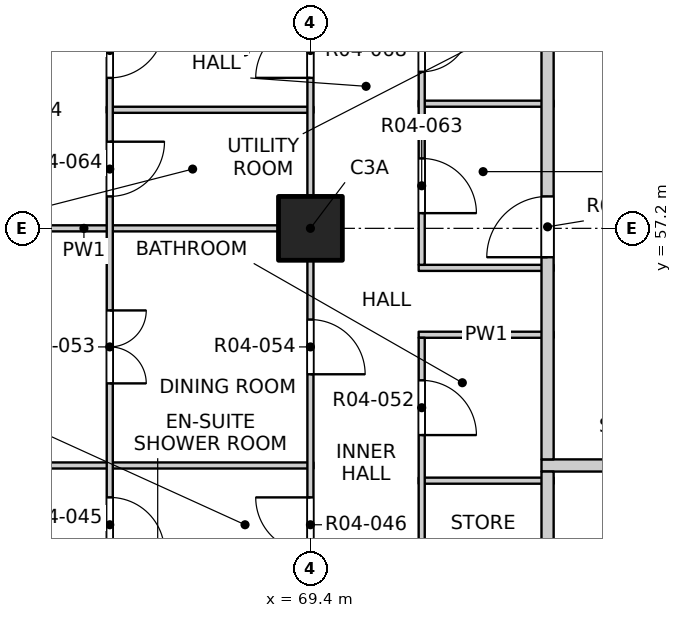
"""IFC4 building model, lengths in metres.
Left out: names, types, materials, properties, quantities, classifications, styles, units other than length and angle.
Written with IfcOpenShell. Run it as: python <this file> out.ifc"""

import sys

from ifc_helpers import new_model, si_unit, direction, frame, frame_2d, origin, origin_2d, place, context, subcontext, project, spatial, rectangle, extrude, element, fill, save


model = new_model("IFC4")
c1 = context("Model", 3, precision=1e-05, world=origin(), true_north=direction((0.0, 1.0)))
c2 = subcontext(c1, "Body", "Model", "MODEL_VIEW")
j1 = project(units=[si_unit("LENGTHUNIT", "METRE"), si_unit("PLANEANGLEUNIT", "RADIAN")], contexts=[c1])
p1 = place(None, origin())
s1 = spatial("IfcSite", under=j1, at=p1, CompositionType="ELEMENT")
p2 = place(p1, origin())
s2 = spatial("IfcBuilding", under=s1, at=p2, CompositionType="ELEMENT")
p3 = place(p2, frame((0.0, 0.0, 58.0)))
s3 = spatial("IfcBuildingStorey", under=s2, at=p3, CompositionType="ELEMENT", Elevation=58.0)
p4 = place(p3, frame((69.4, 57.2, -0.25), z_axis=(0.0, 0.0, 1.0), x_axis=(1.0, 0.0, 0.0)))
e1 = element("IfcColumn", 1, at=p4, inside=s3, PredefinedType="COLUMN", context=c2, shape_type="SweptSolid", body=[
    extrude(rectangle(XDim=1.05, YDim=1.05, at=origin_2d()), origin(), (0.0, 0.0, 1.0), 3.4),
])
p5 = place(p3, frame((71.18, 53.05, 0.0), z_axis=(0.0, 0.0, 1.0), x_axis=(1.0, 0.0, 0.0)))
e2 = element("IfcWall", 2, at=p5, inside=s3, PredefinedType="PARTITIONING", context=c2, shape_type="SweptSolid", body=[
    extrude(rectangle(XDim=2.22, YDim=0.1, at=frame_2d((1.11, 0.0))), origin(), (0.0, 0.0, 1.0), 3.15),
])
p6 = place(p3, frame((61.9, 53.3, 0.0), z_axis=(0.0, 0.0, 1.0), x_axis=(1.0, 0.0, 0.0)))
e3 = element("IfcWall", 3, at=p6, inside=s3, PredefinedType="PARTITIONING", context=c2, shape_type="SweptSolid", body=[
    extrude(rectangle(XDim=7.55, YDim=0.1, at=frame_2d((3.775, 0.0))), origin(), (0.0, 0.0, 1.0), 3.15),
])
p7 = place(p3, frame((73.2, 53.3, 0.0), z_axis=(0.0, 0.0, 1.0), x_axis=(1.0, 0.0, 0.0)))
e4 = element("IfcWall", 4, at=p7, inside=s3, PredefinedType="PARTITIONING", context=c2, shape_type="SweptSolid", body=[
    extrude(rectangle(XDim=23.6, YDim=0.2, at=frame_2d((11.8, 0.0))), origin(), (0.0, 0.0, 1.0), 3.15),
])
p8 = place(p7, frame((2.975, 0.0, 0.0)))
e5 = element("IfcOpeningElement", 5, at=p8, cuts=e4, PredefinedType="OPENING", context=c2, shape_type="SweptSolid", body=[
    extrude(rectangle(XDim=1.0, YDim=2.1, at=frame_2d((0.5, 1.05))), frame((0.0, 0.11, 0.0), z_axis=(0.0, -1.0, 0.0), x_axis=(1.0, 0.0, 0.0)), (0.0, 0.0, 1.0), 0.22),
])
p9 = place(p7, frame((17.875, 0.0, 0.0)))
e6 = element("IfcOpeningElement", 6, at=p9, cuts=e4, PredefinedType="OPENING", context=c2, shape_type="SweptSolid", body=[
    extrude(rectangle(XDim=1.0, YDim=2.1, at=frame_2d((0.5, 1.05))), frame((0.0, 0.11, 0.0), z_axis=(0.0, -1.0, 0.0), x_axis=(1.0, 0.0, 0.0)), (0.0, 0.0, 1.0), 0.22),
])
for number, where, z_axis, x_axis in (
    (7, (71.18, 55.45, 0.0), (0.0, 0.0, 1.0), (1.0, 0.0, 0.0)),
    (8, (71.18, 56.55, 0.0), (0.0, 0.0, 1.0), (1.0, 0.0, 0.0)),
):
    element("IfcWall", number, at=place(p3, frame(where, z_axis=z_axis, x_axis=x_axis)), inside=s3, PredefinedType="PARTITIONING", context=c2, shape_type="SweptSolid", body=[
        extrude(rectangle(XDim=2.22, YDim=0.1, at=frame_2d((1.11, 0.0))), origin(), (0.0, 0.0, 1.0), 3.15),
    ])
p10 = place(p3, frame((61.9, 57.2, 0.0), z_axis=(0.0, 0.0, 1.0), x_axis=(1.0, 0.0, 0.0)))
e9 = element("IfcWall", 9, at=p10, inside=s3, PredefinedType="PARTITIONING", context=c2, shape_type="SweptSolid", body=[
    extrude(rectangle(XDim=7.55, YDim=0.1, at=frame_2d((3.775, 0.0))), origin(), (0.0, 0.0, 1.0), 2.55),
])
p11 = place(p3, frame((66.05, 59.15, 0.0), z_axis=(0.0, 0.0, 1.0), x_axis=(1.0, 0.0, 0.0)))
e10 = element("IfcWall", 10, at=p11, inside=s3, PredefinedType="PARTITIONING", context=c2, shape_type="SweptSolid", body=[
    extrude(rectangle(XDim=3.4, YDim=0.1, at=frame_2d((1.7, 0.0))), origin(), (0.0, 0.0, 1.0), 3.15),
])
p12 = place(p3, frame((71.18, 59.25, 0.0), z_axis=(0.0, 0.0, 1.0), x_axis=(1.0, 0.0, 0.0)))
e11 = element("IfcWall", 11, at=p12, inside=s3, PredefinedType="PARTITIONING", context=c2, shape_type="SweptSolid", body=[
    extrude(rectangle(XDim=2.22, YDim=0.1, at=frame_2d((1.11, 0.0))), origin(), (0.0, 0.0, 1.0), 3.15),
])
p13 = place(p3, frame((66.1, 41.9, 0.0), z_axis=(0.0, 0.0, 1.0), x_axis=(0.0, 1.0, 0.0)))
e12 = element("IfcWall", 12, at=p13, inside=s3, PredefinedType="PARTITIONING", context=c2, shape_type="SweptSolid", body=[
    extrude(rectangle(XDim=19.1, YDim=0.1, at=frame_2d((9.55, 0.0))), origin(), (0.0, 0.0, 1.0), 3.15),
])
p14 = place(p13, frame((1.05, 0.0, 0.0)))
e13 = element("IfcOpeningElement", 13, at=p14, cuts=e12, PredefinedType="OPENING", context=c2, shape_type="SweptSolid", body=[
    extrude(rectangle(XDim=1.2, YDim=2.1, at=frame_2d((0.6, 1.05))), frame((0.0, 0.06, 0.0), z_axis=(0.0, -1.0, 0.0), x_axis=(1.0, 0.0, 0.0)), (0.0, 0.0, 1.0), 0.12),
])
p15 = place(p13, frame((4.125, 0.0, 0.0)))
e14 = element("IfcOpeningElement", 14, at=p15, cuts=e12, PredefinedType="OPENING", context=c2, shape_type="SweptSolid", body=[
    extrude(rectangle(XDim=0.9, YDim=2.1, at=frame_2d((0.45, 1.05))), frame((0.0, 0.06, 0.0), z_axis=(0.0, -1.0, 0.0), x_axis=(1.0, 0.0, 0.0)), (0.0, 0.0, 1.0), 0.12),
])
p16 = place(p13, frame((6.075, 0.0, 0.0)))
e15 = element("IfcOpeningElement", 15, at=p16, cuts=e12, PredefinedType="OPENING", context=c2, shape_type="SweptSolid", body=[
    extrude(rectangle(XDim=0.9, YDim=2.1, at=frame_2d((0.45, 1.05))), frame((0.0, 0.06, 0.0), z_axis=(0.0, -1.0, 0.0), x_axis=(1.0, 0.0, 0.0)), (0.0, 0.0, 1.0), 0.12),
])
p17 = place(p13, frame((8.025, 0.0, 0.0)))
e16 = element("IfcOpeningElement", 16, at=p17, cuts=e12, PredefinedType="OPENING", context=c2, shape_type="SweptSolid", body=[
    extrude(rectangle(XDim=0.9, YDim=2.1, at=frame_2d((0.45, 1.05))), frame((0.0, 0.06, 0.0), z_axis=(0.0, -1.0, 0.0), x_axis=(1.0, 0.0, 0.0)), (0.0, 0.0, 1.0), 0.12),
])
p18 = place(p13, frame((9.975, 0.0, 0.0)))
e17 = element("IfcOpeningElement", 17, at=p18, cuts=e12, PredefinedType="OPENING", context=c2, shape_type="SweptSolid", body=[
    extrude(rectangle(XDim=0.9, YDim=2.1, at=frame_2d((0.45, 1.05))), frame((0.0, 0.06, 0.0), z_axis=(0.0, -1.0, 0.0), x_axis=(1.0, 0.0, 0.0)), (0.0, 0.0, 1.0), 0.12),
])
p19 = place(p13, frame((12.75, 0.0, 0.0)))
e18 = element("IfcOpeningElement", 18, at=p19, cuts=e12, PredefinedType="OPENING", context=c2, shape_type="SweptSolid", body=[
    extrude(rectangle(XDim=1.2, YDim=2.1, at=frame_2d((0.6, 1.05))), frame((0.0, 0.06, 0.0), z_axis=(0.0, -1.0, 0.0), x_axis=(1.0, 0.0, 0.0)), (0.0, 0.0, 1.0), 0.12),
])
p20 = place(p13, frame((15.825, 0.0, 0.0)))
e19 = element("IfcOpeningElement", 19, at=p20, cuts=e12, PredefinedType="OPENING", context=c2, shape_type="SweptSolid", body=[
    extrude(rectangle(XDim=0.9, YDim=2.1, at=frame_2d((0.45, 1.05))), frame((0.0, 0.06, 0.0), z_axis=(0.0, -1.0, 0.0), x_axis=(1.0, 0.0, 0.0)), (0.0, 0.0, 1.0), 0.12),
])
p21 = place(p13, frame((17.775, 0.0, 0.0)))
e20 = element("IfcOpeningElement", 20, at=p21, cuts=e12, PredefinedType="OPENING", context=c2, shape_type="SweptSolid", body=[
    extrude(rectangle(XDim=0.9, YDim=2.1, at=frame_2d((0.45, 1.05))), frame((0.0, 0.06, 0.0), z_axis=(0.0, -1.0, 0.0), x_axis=(1.0, 0.0, 0.0)), (0.0, 0.0, 1.0), 0.12),
])
p22 = place(p3, frame((69.4, 49.4, 0.0), z_axis=(0.0, 0.0, 1.0), x_axis=(0.0, 1.0, 0.0)))
e21 = element("IfcWall", 21, at=p22, inside=s3, PredefinedType="PARTITIONING", context=c2, shape_type="SweptSolid", body=[
    extrude(rectangle(XDim=31.2, YDim=0.1, at=frame_2d((15.6, 0.0))), origin(), (0.0, 0.0, 1.0), 3.15),
])
p23 = place(p22, frame((2.475, 0.0, 0.0)))
e22 = element("IfcOpeningElement", 22, at=p23, cuts=e21, PredefinedType="OPENING", context=c2, shape_type="SweptSolid", body=[
    extrude(rectangle(XDim=0.9, YDim=2.1, at=frame_2d((0.45, 1.05))), frame((0.0, 0.06, 0.0), z_axis=(0.0, -1.0, 0.0), x_axis=(1.0, 0.0, 0.0)), (0.0, 0.0, 1.0), 0.12),
])
p24 = place(p22, frame((5.4, 0.0, 0.0)))
e23 = element("IfcOpeningElement", 23, at=p24, cuts=e21, PredefinedType="OPENING", context=c2, shape_type="SweptSolid", body=[
    extrude(rectangle(XDim=0.9, YDim=2.1, at=frame_2d((0.45, 1.05))), frame((0.0, 0.06, 0.0), z_axis=(0.0, -1.0, 0.0), x_axis=(1.0, 0.0, 0.0)), (0.0, 0.0, 1.0), 0.12),
])
p25 = place(p22, frame((10.275, 0.0, 0.0)))
e24 = element("IfcOpeningElement", 24, at=p25, cuts=e21, PredefinedType="OPENING", context=c2, shape_type="SweptSolid", body=[
    extrude(rectangle(XDim=0.9, YDim=2.1, at=frame_2d((0.45, 1.05))), frame((0.0, 0.06, 0.0), z_axis=(0.0, -1.0, 0.0), x_axis=(1.0, 0.0, 0.0)), (0.0, 0.0, 1.0), 0.12),
])
p26 = place(p22, frame((13.2, 0.0, 0.0)))
e25 = element("IfcOpeningElement", 25, at=p26, cuts=e21, PredefinedType="OPENING", context=c2, shape_type="SweptSolid", body=[
    extrude(rectangle(XDim=0.9, YDim=2.1, at=frame_2d((0.45, 1.05))), frame((0.0, 0.06, 0.0), z_axis=(0.0, -1.0, 0.0), x_axis=(1.0, 0.0, 0.0)), (0.0, 0.0, 1.0), 0.12),
])
p27 = place(p22, frame((18.075, 0.0, 0.0)))
e26 = element("IfcOpeningElement", 26, at=p27, cuts=e21, PredefinedType="OPENING", context=c2, shape_type="SweptSolid", body=[
    extrude(rectangle(XDim=0.9, YDim=2.1, at=frame_2d((0.45, 1.05))), frame((0.0, 0.06, 0.0), z_axis=(0.0, -1.0, 0.0), x_axis=(1.0, 0.0, 0.0)), (0.0, 0.0, 1.0), 0.12),
])
p28 = place(p22, frame((21.8, 0.0, 0.0)))
e27 = element("IfcOpeningElement", 27, at=p28, cuts=e21, PredefinedType="OPENING", context=c2, shape_type="SweptSolid", body=[
    extrude(rectangle(XDim=0.9, YDim=2.1, at=frame_2d((0.45, 1.05))), frame((0.0, 0.06, 0.0), z_axis=(0.0, -1.0, 0.0), x_axis=(1.0, 0.0, 0.0)), (0.0, 0.0, 1.0), 0.12),
])
p29 = place(p22, frame((25.875, 0.0, 0.0)))
e28 = element("IfcOpeningElement", 28, at=p29, cuts=e21, PredefinedType="OPENING", context=c2, shape_type="SweptSolid", body=[
    extrude(rectangle(XDim=0.9, YDim=2.1, at=frame_2d((0.45, 1.05))), frame((0.0, 0.06, 0.0), z_axis=(0.0, -1.0, 0.0), x_axis=(1.0, 0.0, 0.0)), (0.0, 0.0, 1.0), 0.12),
])
p30 = place(p22, frame((29.6, 0.0, 0.0)))
e29 = element("IfcOpeningElement", 29, at=p30, cuts=e21, PredefinedType="OPENING", context=c2, shape_type="SweptSolid", body=[
    extrude(rectangle(XDim=0.9, YDim=2.1, at=frame_2d((0.45, 1.05))), frame((0.0, 0.06, 0.0), z_axis=(0.0, -1.0, 0.0), x_axis=(1.0, 0.0, 0.0)), (0.0, 0.0, 1.0), 0.12),
])
p31 = place(p3, frame((71.23, 45.55, 0.0), z_axis=(0.0, 0.0, 1.0), x_axis=(0.0, 1.0, 0.0)))
e30 = element("IfcWall", 30, at=p31, inside=s3, PredefinedType="PARTITIONING", context=c2, shape_type="SweptSolid", body=[
    extrude(rectangle(XDim=9.85, YDim=0.1, at=frame_2d((4.925, 0.0))), origin(), (0.0, 0.0, 1.0), 3.15),
])
p32 = place(p31, frame((0.4, 0.0, 0.0)))
e31 = element("IfcOpeningElement", 31, at=p32, cuts=e30, PredefinedType="OPENING", context=c2, shape_type="SweptSolid", body=[
    extrude(rectangle(XDim=0.9, YDim=2.1, at=frame_2d((0.45, 1.05))), frame((0.0, 0.06, 0.0), z_axis=(0.0, -1.0, 0.0), x_axis=(1.0, 0.0, 0.0)), (0.0, 0.0, 1.0), 0.12),
])
p33 = place(p31, frame((2.725, 0.0, 0.0)))
e32 = element("IfcOpeningElement", 32, at=p33, cuts=e30, PredefinedType="OPENING", context=c2, shape_type="SweptSolid", body=[
    extrude(rectangle(XDim=0.8, YDim=2.1, at=frame_2d((0.4, 1.05))), frame((0.0, 0.06, 0.0), z_axis=(0.0, -1.0, 0.0), x_axis=(1.0, 0.0, 0.0)), (0.0, 0.0, 1.0), 0.12),
])
p34 = place(p31, frame((5.6, 0.0, 0.0)))
e33 = element("IfcOpeningElement", 33, at=p34, cuts=e30, PredefinedType="OPENING", context=c2, shape_type="SweptSolid", body=[
    extrude(rectangle(XDim=0.8, YDim=2.1, at=frame_2d((0.4, 1.05))), frame((0.0, 0.06, 0.0), z_axis=(0.0, -1.0, 0.0), x_axis=(1.0, 0.0, 0.0)), (0.0, 0.0, 1.0), 0.12),
])
p35 = place(p31, frame((8.25, 0.0, 0.0)))
e34 = element("IfcOpeningElement", 34, at=p35, cuts=e30, PredefinedType="OPENING", context=c2, shape_type="SweptSolid", body=[
    extrude(rectangle(XDim=0.9, YDim=2.1, at=frame_2d((0.45, 1.05))), frame((0.0, 0.06, 0.0), z_axis=(0.0, -1.0, 0.0), x_axis=(1.0, 0.0, 0.0)), (0.0, 0.0, 1.0), 0.12),
])
p36 = place(p3, frame((71.23, 56.6, 0.0), z_axis=(0.0, 0.0, 1.0), x_axis=(0.0, 1.0, 0.0)))
e35 = element("IfcWall", 35, at=p36, inside=s3, PredefinedType="PARTITIONING", context=c2, shape_type="SweptSolid", body=[
    extrude(rectangle(XDim=17.15, YDim=0.1, at=frame_2d((8.575, 0.0))), origin(), (0.0, 0.0, 1.0), 3.15),
])
p37 = place(p36, frame((0.85, 0.0, 0.0)))
e36 = element("IfcOpeningElement", 36, at=p37, cuts=e35, PredefinedType="OPENING", context=c2, shape_type="SweptSolid", body=[
    extrude(rectangle(XDim=0.9, YDim=2.1, at=frame_2d((0.45, 1.05))), frame((0.0, 0.06, 0.0), z_axis=(0.0, -1.0, 0.0), x_axis=(1.0, 0.0, 0.0)), (0.0, 0.0, 1.0), 0.12),
])
p38 = place(p36, frame((3.175, 0.0, 0.0)))
e37 = element("IfcOpeningElement", 37, at=p38, cuts=e35, PredefinedType="OPENING", context=c2, shape_type="SweptSolid", body=[
    extrude(rectangle(XDim=0.8, YDim=2.1, at=frame_2d((0.4, 1.05))), frame((0.0, 0.06, 0.0), z_axis=(0.0, -1.0, 0.0), x_axis=(1.0, 0.0, 0.0)), (0.0, 0.0, 1.0), 0.12),
])
p39 = place(p36, frame((5.66, 0.0, 0.0)))
e38 = element("IfcOpeningElement", 38, at=p39, cuts=e35, PredefinedType="OPENING", context=c2, shape_type="SweptSolid", body=[
    extrude(rectangle(XDim=0.9, YDim=2.1, at=frame_2d((0.45, 1.05))), frame((0.0, 0.06, 0.0), z_axis=(0.0, -1.0, 0.0), x_axis=(1.0, 0.0, 0.0)), (0.0, 0.0, 1.0), 0.12),
])
p40 = place(p36, frame((8.62, 0.0, 0.0)))
e39 = element("IfcOpeningElement", 39, at=p40, cuts=e35, PredefinedType="OPENING", context=c2, shape_type="SweptSolid", body=[
    extrude(rectangle(XDim=0.8, YDim=2.1, at=frame_2d((0.4, 1.05))), frame((0.0, 0.06, 0.0), z_axis=(0.0, -1.0, 0.0), x_axis=(1.0, 0.0, 0.0)), (0.0, 0.0, 1.0), 0.12),
])
p41 = place(p36, frame((11.22, 0.0, 0.0)))
e40 = element("IfcOpeningElement", 40, at=p41, cuts=e35, PredefinedType="OPENING", context=c2, shape_type="SweptSolid", body=[
    extrude(rectangle(XDim=0.8, YDim=2.1, at=frame_2d((0.4, 1.05))), frame((0.0, 0.06, 0.0), z_axis=(0.0, -1.0, 0.0), x_axis=(1.0, 0.0, 0.0)), (0.0, 0.0, 1.0), 0.12),
])
p42 = place(p36, frame((13.67, 0.0, 0.0)))
e41 = element("IfcOpeningElement", 41, at=p42, cuts=e35, PredefinedType="OPENING", context=c2, shape_type="SweptSolid", body=[
    extrude(rectangle(XDim=0.9, YDim=2.1, at=frame_2d((0.45, 1.05))), frame((0.0, 0.06, 0.0), z_axis=(0.0, -1.0, 0.0), x_axis=(1.0, 0.0, 0.0)), (0.0, 0.0, 1.0), 0.12),
])
p43 = place(p36, frame((15.81, 0.0, 0.0)))
e42 = element("IfcOpeningElement", 42, at=p43, cuts=e35, PredefinedType="OPENING", context=c2, shape_type="SweptSolid", body=[
    extrude(rectangle(XDim=0.9, YDim=2.1, at=frame_2d((0.45, 1.05))), frame((0.0, 0.06, 0.0), z_axis=(0.0, -1.0, 0.0), x_axis=(1.0, 0.0, 0.0)), (0.0, 0.0, 1.0), 0.12),
])
p44 = place(p3, frame((73.3, 41.9, 0.0), z_axis=(0.0, 0.0, 1.0), x_axis=(0.0, 1.0, 0.0)))
e43 = element("IfcWall", 43, at=p44, inside=s3, PredefinedType="PARTITIONING", context=c2, shape_type="SweptSolid", body=[
    extrude(rectangle(XDim=11.3, YDim=0.2, at=frame_2d((5.65, 0.0))), origin(), (0.0, 0.0, 1.0), 3.15),
])
p45 = place(p3, frame((73.3, 53.4, 0.0), z_axis=(0.0, 0.0, 1.0), x_axis=(0.0, 1.0, 0.0)))
e44 = element("IfcWall", 44, at=p45, inside=s3, PredefinedType="PARTITIONING", context=c2, shape_type="SweptSolid", body=[
    extrude(rectangle(XDim=31.0, YDim=0.2, at=frame_2d((15.5, 0.0))), origin(), (0.0, 0.0, 1.0), 3.15),
])
p46 = place(p45, frame((3.325, 0.0, 0.0)))
e45 = element("IfcOpeningElement", 45, at=p46, cuts=e44, PredefinedType="OPENING", context=c2, shape_type="SweptSolid", body=[
    extrude(rectangle(XDim=1.0, YDim=2.1, at=frame_2d((0.5, 1.05))), frame((0.0, 0.11, 0.0), z_axis=(0.0, -1.0, 0.0), x_axis=(1.0, 0.0, 0.0)), (0.0, 0.0, 1.0), 0.22),
])
p47 = place(p45, frame((21.675, 0.0, 0.0)))
e46 = element("IfcOpeningElement", 46, at=p47, cuts=e44, PredefinedType="OPENING", context=c2, shape_type="SweptSolid", body=[
    extrude(rectangle(XDim=1.0, YDim=2.1, at=frame_2d((0.5, 1.05))), frame((0.0, 0.11, 0.0), z_axis=(0.0, -1.0, 0.0), x_axis=(1.0, 0.0, 0.0)), (0.0, 0.0, 1.0), 0.22),
])
p48 = place(p45, frame((26.225, 0.0, 0.0)))
e47 = element("IfcOpeningElement", 47, at=p48, cuts=e44, PredefinedType="OPENING", context=c2, shape_type="SweptSolid", body=[
    extrude(rectangle(XDim=1.0, YDim=2.1, at=frame_2d((0.5, 1.05))), frame((0.0, 0.11, 0.0), z_axis=(0.0, -1.0, 0.0), x_axis=(1.0, 0.0, 0.0)), (0.0, 0.0, 1.0), 0.22),
])
p49 = place(p18, origin())
e48 = element("IfcDoor", 48, at=p49, inside=s3, OperationType="SINGLE_SWING_RIGHT", PredefinedType="DOOR", context=c2, shape_type="SweptSolid", body=[
    extrude(rectangle(XDim=0.9, YDim=2.1, at=frame_2d((0.45, 1.05))), frame((0.0, 0.025, 0.0), z_axis=(0.0, -1.0, 0.0), x_axis=(1.0, 0.0, 0.0)), (0.0, 0.0, 1.0), 0.05),
])
fill(e17, e48)
p50 = place(p23, origin())
e49 = element("IfcDoor", 49, at=p50, inside=s3, OperationType="SINGLE_SWING_RIGHT", PredefinedType="DOOR", context=c2, shape_type="SweptSolid", body=[
    extrude(rectangle(XDim=0.9, YDim=2.1, at=frame_2d((0.45, 1.05))), frame((0.0, 0.025, 0.0), z_axis=(0.0, -1.0, 0.0), x_axis=(1.0, 0.0, 0.0)), (0.0, 0.0, 1.0), 0.05),
])
fill(e22, e49)
p51 = place(p35, origin())
e50 = element("IfcDoor", 50, at=p51, inside=s3, OperationType="SINGLE_SWING_RIGHT", PredefinedType="DOOR", context=c2, shape_type="SweptSolid", body=[
    extrude(rectangle(XDim=0.9, YDim=2.1, at=frame_2d((0.45, 1.05))), frame((0.0, 0.025, 0.0), z_axis=(0.0, -1.0, 0.0), x_axis=(1.0, 0.0, 0.0)), (0.0, 0.0, 1.0), 0.05),
])
fill(e34, e50)
p52 = place(p19, origin())
e51 = element("IfcDoor", 51, at=p52, inside=s3, OperationType="DOUBLE_DOOR_SINGLE_SWING", PredefinedType="DOOR", context=c2, shape_type="SweptSolid", body=[
    extrude(rectangle(XDim=1.2, YDim=2.1, at=frame_2d((0.6, 1.05))), frame((0.0, 0.025, 0.0), z_axis=(0.0, -1.0, 0.0), x_axis=(1.0, 0.0, 0.0)), (0.0, 0.0, 1.0), 0.05),
])
fill(e18, e51)
p53 = place(p24, origin())
e52 = element("IfcDoor", 52, at=p53, inside=s3, OperationType="SINGLE_SWING_RIGHT", PredefinedType="DOOR", context=c2, shape_type="SweptSolid", body=[
    extrude(rectangle(XDim=0.9, YDim=2.1, at=frame_2d((0.45, 1.05))), frame((0.0, 0.025, 0.0), z_axis=(0.0, -1.0, 0.0), x_axis=(1.0, 0.0, 0.0)), (0.0, 0.0, 1.0), 0.05),
])
fill(e23, e52)
p54 = place(p46, origin())
e53 = element("IfcDoor", 53, at=p54, inside=s3, OperationType="SINGLE_SWING_RIGHT", PredefinedType="DOOR", context=c2, shape_type="SweptSolid", body=[
    extrude(rectangle(XDim=1.0, YDim=2.1, at=frame_2d((0.5, 1.05))), frame((0.0, 0.025, 0.0), z_axis=(0.0, -1.0, 0.0), x_axis=(1.0, 0.0, 0.0)), (0.0, 0.0, 1.0), 0.05),
])
fill(e45, e53)
p55 = place(p37, origin())
e54 = element("IfcDoor", 54, at=p55, inside=s3, OperationType="SINGLE_SWING_RIGHT", PredefinedType="DOOR", context=c2, shape_type="SweptSolid", body=[
    extrude(rectangle(XDim=0.9, YDim=2.1, at=frame_2d((0.45, 1.05))), frame((0.0, 0.025, 0.0), z_axis=(0.0, -1.0, 0.0), x_axis=(1.0, 0.0, 0.0)), (0.0, 0.0, 1.0), 0.05),
])
fill(e36, e54)
p56 = place(p20, origin())
e55 = element("IfcDoor", 55, at=p56, inside=s3, OperationType="SINGLE_SWING_LEFT", PredefinedType="DOOR", context=c2, shape_type="SweptSolid", body=[
    extrude(rectangle(XDim=0.9, YDim=2.1, at=frame_2d((0.45, 1.05))), frame((0.0, 0.025, 0.0), z_axis=(0.0, -1.0, 0.0), x_axis=(1.0, 0.0, 0.0)), (0.0, 0.0, 1.0), 0.05),
])
fill(e19, e55)
p57 = place(p21, origin())
e56 = element("IfcDoor", 56, at=p57, inside=s3, OperationType="SINGLE_SWING_LEFT", PredefinedType="DOOR", context=c2, shape_type="SweptSolid", body=[
    extrude(rectangle(XDim=0.9, YDim=2.1, at=frame_2d((0.45, 1.05))), frame((0.0, 0.025, 0.0), z_axis=(0.0, -1.0, 0.0), x_axis=(1.0, 0.0, 0.0)), (0.0, 0.0, 1.0), 0.05),
])
fill(e20, e56)
p58 = place(p25, origin())
e57 = element("IfcDoor", 57, at=p58, inside=s3, OperationType="SINGLE_SWING_LEFT", PredefinedType="DOOR", context=c2, shape_type="SweptSolid", body=[
    extrude(rectangle(XDim=0.9, YDim=2.1, at=frame_2d((0.45, 1.05))), frame((0.0, 0.025, 0.0), z_axis=(0.0, -1.0, 0.0), x_axis=(1.0, 0.0, 0.0)), (0.0, 0.0, 1.0), 0.05),
])
fill(e24, e57)
p59 = place(p38, origin())
e58 = element("IfcDoor", 58, at=p59, inside=s3, OperationType="SINGLE_SWING_LEFT", PredefinedType="DOOR", context=c2, shape_type="SweptSolid", body=[
    extrude(rectangle(XDim=0.8, YDim=2.1, at=frame_2d((0.4, 1.05))), frame((0.0, 0.025, 0.0), z_axis=(0.0, -1.0, 0.0), x_axis=(1.0, 0.0, 0.0)), (0.0, 0.0, 1.0), 0.05),
])
fill(e37, e58)
save(model, sys.argv[1])
